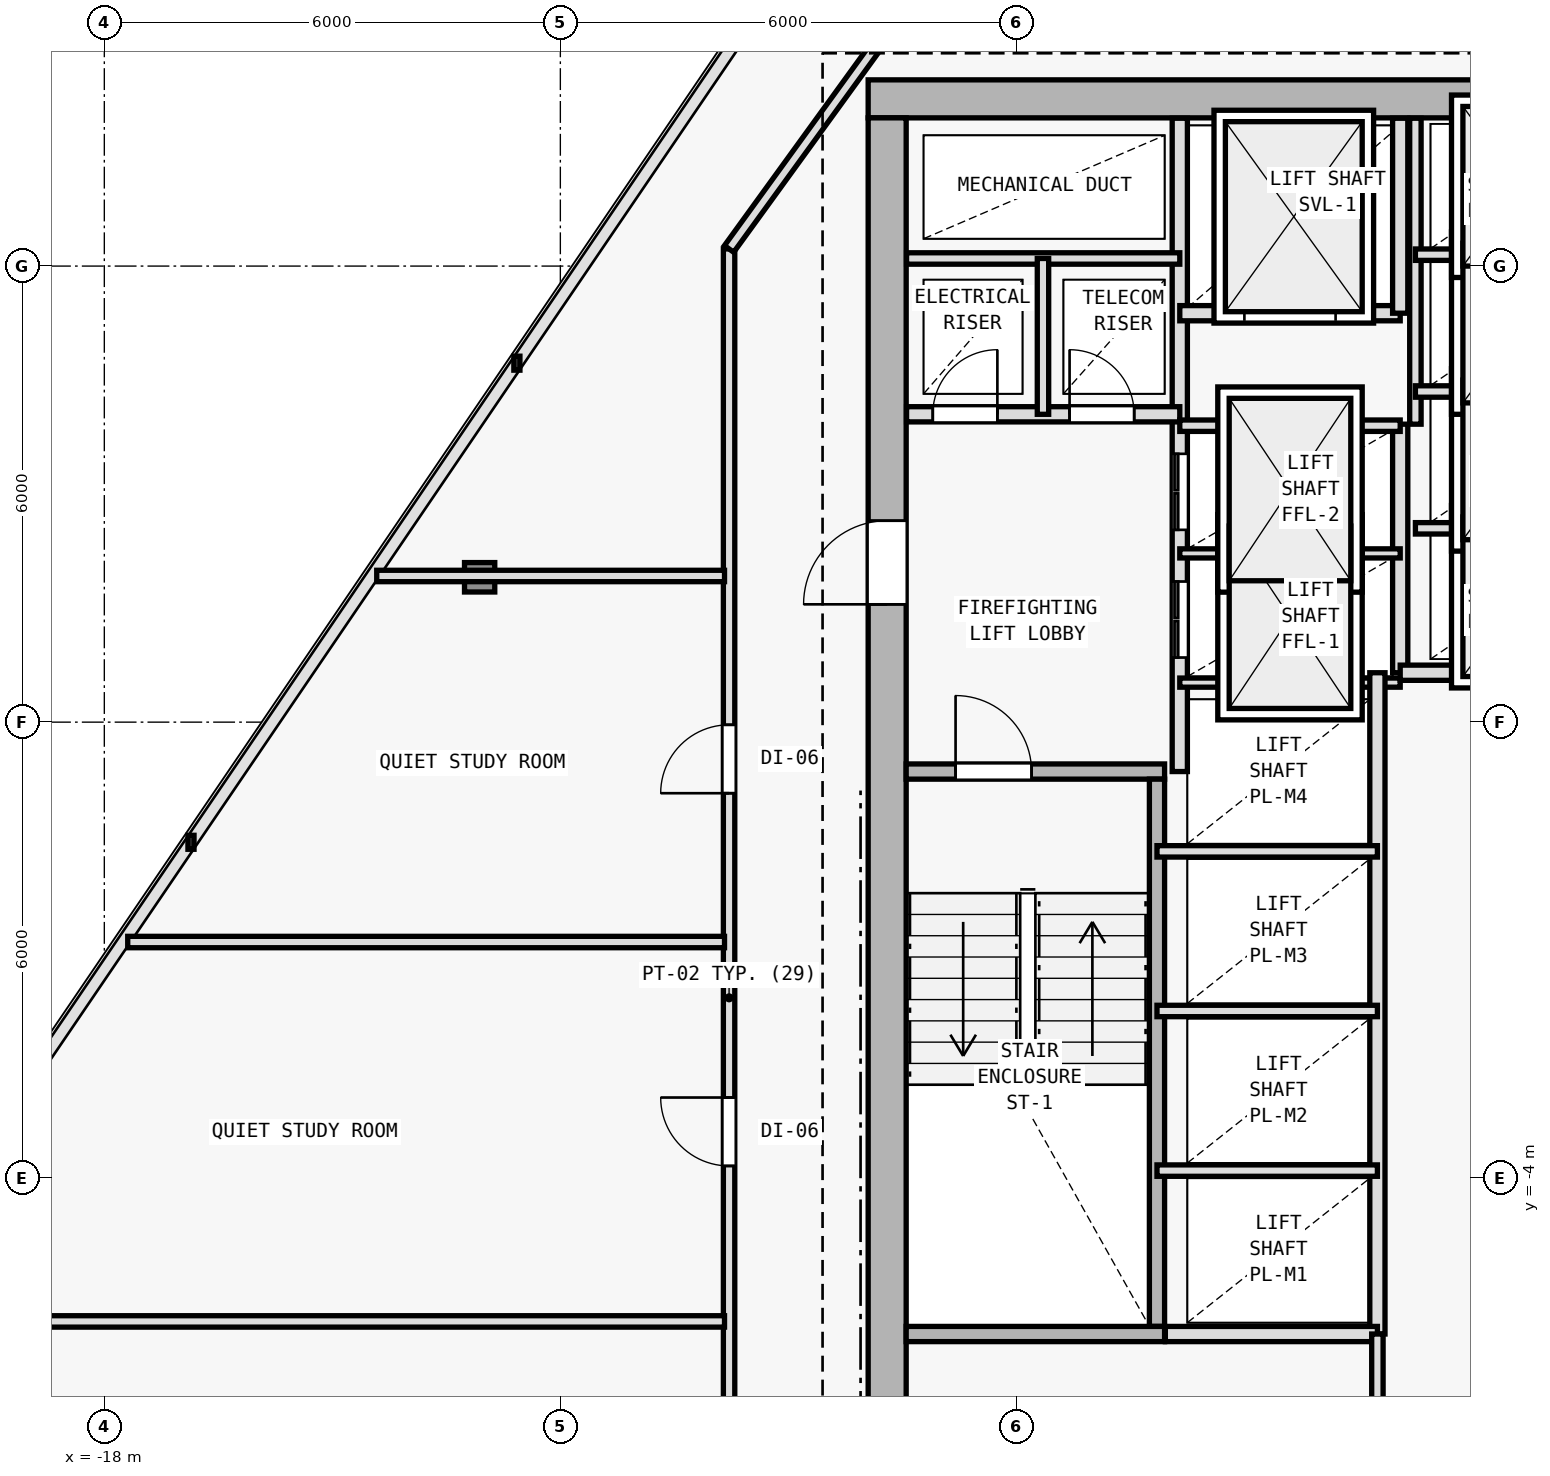
"""IFC4 building model, lengths in metres.
Left out: names, types, materials, properties, quantities, classifications, styles, units other than length and angle.
Written with IfcOpenShell. Run it as: python <this file> out.ifc"""

import sys

from ifc_helpers import new_model, si_unit, direction, frame, frame_2d, origin, origin_2d, place, context, subcontext, project, spatial, rectangle, i_section, extrude, element, fill, save


model = new_model("IFC4")
c1 = context("Model", 3, precision=1e-05, world=origin(), true_north=direction((0.0, 1.0)))
c2 = subcontext(c1, "Body", "Model", "MODEL_VIEW")
j1 = project(units=[si_unit("LENGTHUNIT", "METRE"), si_unit("PLANEANGLEUNIT", "RADIAN")], contexts=[c1])
p1 = place(None, origin())
s1 = spatial("IfcSite", under=j1, at=p1, CompositionType="ELEMENT")
p2 = place(p1, origin())
s2 = spatial("IfcBuilding", under=s1, at=p2, CompositionType="ELEMENT")
p3 = place(p2, frame((0.0, 0.0, 216.3)))
s3 = spatial("IfcBuildingStorey", under=s2, at=p3, CompositionType="ELEMENT", Elevation=216.3)
for number, where, z_axis, x_axis in (
    (1, (-7.7, 10.2, 0.0), (0.0, 0.0, 1.0), (1.0, 0.0, 0.0)),
    (2, (-7.7, 2.0, 0.0), (0.0, 0.0, 1.0), (1.0, 0.0, 0.0)),
):
    element("IfcColumn", number, at=place(p3, frame(where, z_axis=z_axis, x_axis=x_axis)), inside=s3, PredefinedType="COLUMN", context=c2, shape_type="SweptSolid", body=[
        extrude(i_section(OverallWidth=0.398, OverallDepth=0.387, WebThickness=0.013, FlangeThickness=0.022, FilletRadius=0.015, at=origin_2d()), origin(), (0.0, 0.0, 1.0), 3.6),
    ])
p4 = place(p3, frame((-13.062, 3.906, 0.005), z_axis=(0.017070406608, 0.009521342331, 0.99980895438), x_axis=(-0.487119351792, 0.873335409284, 0.0)))
e3 = element("IfcColumn", 3, at=p4, inside=s3, PredefinedType="COLUMN", context=c2, shape_type="SweptSolid", body=[
    extrude(i_section(OverallWidth=0.398, OverallDepth=0.387, WebThickness=0.013, FlangeThickness=0.022, FilletRadius=0.015, at=origin_2d()), origin(), (0.0, 0.0, 1.0), 3.59),
])
p5 = place(p3, frame((7.95, 10.2, 0.0), z_axis=(0.0, 0.0, 1.0), x_axis=(-1.0, 0.0, 0.0)))
e4 = element("IfcWall", 4, at=p5, inside=s3, PredefinedType="SHEAR", context=c2, shape_type="SweptSolid", body=[
    extrude(rectangle(XDim=15.9, YDim=0.5, at=frame_2d((7.95, 0.0))), origin(), (0.0, 0.0, 1.0), 3.35),
])
p6 = place(p5, frame((4.4, 0.0, 0.0)))
e5 = element("IfcOpeningElement", 5, at=p6, cuts=e4, PredefinedType="OPENING", context=c2, shape_type="SweptSolid", body=[
    extrude(rectangle(XDim=1.1, YDim=2.15, at=frame_2d((0.55, 1.075))), frame((0.0, 0.26, 0.0), z_axis=(0.0, -1.0, 0.0), x_axis=(1.0, 0.0, 0.0)), (0.0, 0.0, 1.0), 0.52),
])
p7 = place(p3, frame((-7.7, -9.15, 0.0), z_axis=(0.0, 0.0, 1.0), x_axis=(0.0, 1.0, 0.0)))
e6 = element("IfcWall", 6, at=p7, inside=s3, PredefinedType="SHEAR", context=c2, shape_type="SweptSolid", body=[
    extrude(rectangle(XDim=19.1, YDim=0.5, at=frame_2d((9.55, 0.0))), origin(), (0.0, 0.0, 1.0), 3.35),
])
p8 = place(p7, frame((12.7, 0.0, 0.0)))
e7 = element("IfcOpeningElement", 7, at=p8, cuts=e6, PredefinedType="OPENING", context=c2, shape_type="SweptSolid", body=[
    extrude(rectangle(XDim=1.1, YDim=2.15, at=frame_2d((0.55, 1.075))), frame((0.0, 0.26, 0.0), z_axis=(0.0, -1.0, 0.0), x_axis=(1.0, 0.0, 0.0)), (0.0, 0.0, 1.0), 0.52),
])
p9 = place(p3, frame((-7.45, 1.35, 0.0), z_axis=(0.0, 0.0, 1.0), x_axis=(1.0, 0.0, 0.0)))
e8 = element("IfcWall", 8, at=p9, inside=s3, PredefinedType="SOLIDWALL", context=c2, shape_type="SweptSolid", body=[
    extrude(rectangle(XDim=3.4, YDim=0.2, at=frame_2d((1.7, 0.0))), origin(), (0.0, 0.0, 1.0), 3.35),
])
p10 = place(p9, frame((0.65, 0.0, 0.0)))
e9 = element("IfcOpeningElement", 9, at=p10, cuts=e8, PredefinedType="OPENING", context=c2, shape_type="SweptSolid", body=[
    extrude(rectangle(XDim=1.0, YDim=2.15, at=frame_2d((0.5, 1.075))), frame((0.0, 0.11, 0.0), z_axis=(0.0, -1.0, 0.0), x_axis=(1.0, 0.0, 0.0)), (0.0, 0.0, 1.0), 0.22),
])
p11 = place(p3, frame((-4.15, -5.95, 0.0), z_axis=(0.0, 0.0, 1.0), x_axis=(0.0, 1.0, 0.0)))
e10 = element("IfcWall", 10, at=p11, inside=s3, PredefinedType="SOLIDWALL", context=c2, shape_type="SweptSolid", body=[
    extrude(rectangle(XDim=7.2, YDim=0.2, at=frame_2d((3.6, 0.0))), origin(), (0.0, 0.0, 1.0), 3.35),
])
p12 = place(p3, frame((-3.85, 1.35, 0.0), z_axis=(0.0, 0.0, 1.0), x_axis=(0.0, 1.0, 0.0)))
e11 = element("IfcWall", 11, at=p12, inside=s3, PredefinedType="SOLIDWALL", context=c2, shape_type="SweptSolid", body=[
    extrude(rectangle(XDim=8.595, YDim=0.2, at=frame_2d((4.297, 0.0))), origin(), (0.0, 0.0, 1.0), 3.35),
])
p13 = place(p12, frame((1.5, 0.0, 0.0)))
e12 = element("IfcOpeningElement", 12, at=p13, cuts=e11, PredefinedType="OPENING", context=c2, shape_type="SweptSolid", body=[
    extrude(rectangle(XDim=1.0, YDim=2.15, at=frame_2d((0.5, 1.075))), frame((0.0, 0.11, 0.0), z_axis=(0.0, -1.0, 0.0), x_axis=(1.0, 0.0, 0.0)), (0.0, 0.0, 1.0), 0.22),
])
p14 = place(p12, frame((3.18, 0.0, 0.0)))
e13 = element("IfcOpeningElement", 13, at=p14, cuts=e11, PredefinedType="OPENING", context=c2, shape_type="SweptSolid", body=[
    extrude(rectangle(XDim=1.0, YDim=2.15, at=frame_2d((0.5, 1.075))), frame((0.0, 0.11, 0.0), z_axis=(0.0, -1.0, 0.0), x_axis=(1.0, 0.0, 0.0)), (0.0, 0.0, 1.0), 0.22),
])
p15 = place(p3, frame((-7.445, 6.05, 0.0), z_axis=(0.0, 0.0, 1.0), x_axis=(1.0, 0.0, 0.0)))
e14 = element("IfcWall", 14, at=p15, inside=s3, PredefinedType="SOLIDWALL", context=c2, shape_type="SweptSolid", body=[
    extrude(rectangle(XDim=3.595, YDim=0.2, at=frame_2d((1.797, 0.0))), origin(), (0.0, 0.0, 1.0), 3.35),
])
p16 = place(p15, frame((0.345, 0.0, 0.0)))
e15 = element("IfcOpeningElement", 15, at=p16, cuts=e14, PredefinedType="OPENING", context=c2, shape_type="SweptSolid", body=[
    extrude(rectangle(XDim=0.85, YDim=2.1, at=frame_2d((0.425, 1.05))), frame((0.0, 0.11, 0.0), z_axis=(0.0, -1.0, 0.0), x_axis=(1.0, 0.0, 0.0)), (0.0, 0.0, 1.0), 0.22),
])
p17 = place(p15, frame((2.145, 0.0, 0.0)))
e16 = element("IfcOpeningElement", 16, at=p17, cuts=e14, PredefinedType="OPENING", context=c2, shape_type="SweptSolid", body=[
    extrude(rectangle(XDim=0.85, YDim=2.1, at=frame_2d((0.425, 1.05))), frame((0.0, 0.11, 0.0), z_axis=(0.0, -1.0, 0.0), x_axis=(1.0, 0.0, 0.0)), (0.0, 0.0, 1.0), 0.22),
])
p18 = place(p3, frame((-7.445, 8.1, 0.0), z_axis=(0.0, 0.0, 1.0), x_axis=(1.0, 0.0, 0.0)))
e17 = element("IfcWall", 17, at=p18, inside=s3, PredefinedType="PARTITIONING", context=c2, shape_type="SweptSolid", body=[
    extrude(rectangle(XDim=3.595, YDim=0.15, at=frame_2d((1.797, 0.0))), origin(), (0.0, 0.0, 1.0), 3.35),
])
p19 = place(p3, frame((-5.65, 6.05, 0.0), z_axis=(0.0, 0.0, 1.0), x_axis=(0.0, 1.0, 0.0)))
e18 = element("IfcWall", 18, at=p19, inside=s3, PredefinedType="PARTITIONING", context=c2, shape_type="SweptSolid", body=[
    extrude(rectangle(XDim=2.05, YDim=0.15, at=frame_2d((1.025, 0.0))), origin(), (0.0, 0.0, 1.0), 3.35),
])
p20 = place(p3, frame((-0.95, 2.65, 0.0), z_axis=(0.0, 0.0, 1.0), x_axis=(0.0, 1.0, 0.0)))
e19 = element("IfcWall", 19, at=p20, inside=s3, PredefinedType="SOLIDWALL", context=c2, shape_type="SweptSolid", body=[
    extrude(rectangle(XDim=3.27, YDim=0.2, at=frame_2d((1.635, 0.0))), origin(), (0.0, 0.0, 1.0), 3.35),
])
for number, where, z_axis, x_axis in (
    (20, (-3.85, 2.52, 0.0), (0.0, 0.0, 1.0), (1.0, 0.0, 0.0)),
    (21, (-3.85, 4.22, 0.0), (0.0, 0.0, 1.0), (1.0, 0.0, 0.0)),
):
    element("IfcWall", number, at=place(p3, frame(where, z_axis=z_axis, x_axis=x_axis)), inside=s3, PredefinedType="PARTITIONING", context=c2, shape_type="SweptSolid", body=[
        extrude(rectangle(XDim=2.9, YDim=0.12, at=frame_2d((1.45, 0.0))), origin(), (0.0, 0.0, 1.0), 3.35),
    ])
p21 = place(p3, frame((-3.85, 5.9, 0.0), z_axis=(0.0, 0.0, 1.0), x_axis=(1.0, 0.0, 0.0)))
e22 = element("IfcWall", 22, at=p21, inside=s3, PredefinedType="PARTITIONING", context=c2, shape_type="SweptSolid", body=[
    extrude(rectangle(XDim=2.9, YDim=0.15, at=frame_2d((1.45, 0.0))), origin(), (0.0, 0.0, 1.0), 3.35),
])
p22 = place(p3, frame((-3.85, 7.38, 0.0), z_axis=(0.0, 0.0, 1.0), x_axis=(1.0, 0.0, 0.0)))
e23 = element("IfcWall", 23, at=p22, inside=s3, PredefinedType="SOLIDWALL", context=c2, shape_type="SweptSolid", body=[
    extrude(rectangle(XDim=2.9, YDim=0.2, at=frame_2d((1.45, 0.0))), origin(), (0.0, 0.0, 1.0), 3.35),
])
p23 = place(p22, frame((0.85, 0.0, 0.0)))
e24 = element("IfcOpeningElement", 24, at=p23, cuts=e23, PredefinedType="OPENING", context=c2, shape_type="SweptSolid", body=[
    extrude(rectangle(XDim=1.2, YDim=2.2, at=frame_2d((0.6, 1.1))), frame((0.0, 0.11, 0.0), z_axis=(0.0, -1.0, 0.0), x_axis=(1.0, 0.0, 0.0)), (0.0, 0.0, 1.0), 0.22),
])
p24 = place(p3, frame((-0.95, 7.38, 0.0), z_axis=(0.0, 0.0, 1.0), x_axis=(0.0, 1.0, 0.0)))
e25 = element("IfcWall", 25, at=p24, inside=s3, PredefinedType="SOLIDWALL", context=c2, shape_type="SweptSolid", body=[
    extrude(rectangle(XDim=2.565, YDim=0.2, at=frame_2d((1.283, 0.0))), origin(), (0.0, 0.0, 1.0), 3.35),
])
p25 = place(p3, frame((-1.25, -6.05, 0.0), z_axis=(0.0, 0.0, 1.0), x_axis=(0.0, 1.0, 0.0)))
e26 = element("IfcWall", 26, at=p25, inside=s3, PredefinedType="SOLIDWALL", context=c2, shape_type="SweptSolid", body=[
    extrude(rectangle(XDim=8.7, YDim=0.2, at=frame_2d((4.35, 0.0))), origin(), (0.0, 0.0, 1.0), 3.35),
])
for number, where, z_axis, x_axis in (
    (27, (-4.15, -3.9, 0.0), (0.0, 0.0, 1.0), (1.0, 0.0, 0.0)),
    (28, (-4.15, -1.8, 0.0), (0.0, 0.0, 1.0), (1.0, 0.0, 0.0)),
    (29, (-4.15, 0.3, 0.0), (0.0, 0.0, 1.0), (1.0, 0.0, 0.0)),
):
    element("IfcWall", number, at=place(p3, frame(where, z_axis=z_axis, x_axis=x_axis)), inside=s3, PredefinedType="PARTITIONING", context=c2, shape_type="SweptSolid", body=[
        extrude(rectangle(XDim=2.9, YDim=0.15, at=frame_2d((1.45, 0.0))), origin(), (0.0, 0.0, 1.0), 3.35),
    ])
p26 = place(p3, frame((-0.95, 2.65, 0.0), z_axis=(0.0, 0.0, 1.0), x_axis=(1.0, 0.0, 0.0)))
e30 = element("IfcWall", 30, at=p26, inside=s3, PredefinedType="SOLIDWALL", context=c2, shape_type="SweptSolid", body=[
    extrude(rectangle(XDim=2.9, YDim=0.2, at=frame_2d((1.45, 0.0))), origin(), (0.0, 0.0, 1.0), 3.35),
])
p27 = place(p3, frame((-0.75, 5.92, 0.0), z_axis=(0.0, 0.0, 1.0), x_axis=(0.0, 1.0, 0.0)))
e31 = element("IfcWall", 31, at=p27, inside=s3, PredefinedType="PARTITIONING", context=c2, shape_type="SweptSolid", body=[
    extrude(rectangle(XDim=4.025, YDim=0.15, at=frame_2d((2.013, 0.0))), origin(), (0.0, 0.0, 1.0), 3.35),
])
for number, where, z_axis, x_axis in (
    (32, (-0.75, 4.55, 0.0), (0.0, 0.0, 1.0), (1.0, 0.0, 0.0)),
    (33, (-0.75, 6.35, 0.0), (0.0, 0.0, 1.0), (1.0, 0.0, 0.0)),
    (34, (-0.75, 8.15, 0.0), (0.0, 0.0, 1.0), (1.0, 0.0, 0.0)),
):
    element("IfcWall", number, at=place(p3, frame(where, z_axis=z_axis, x_axis=x_axis)), inside=s3, PredefinedType="PARTITIONING", context=c2, shape_type="SweptSolid", body=[
        extrude(rectangle(XDim=2.7, YDim=0.15, at=frame_2d((1.35, 0.0))), origin(), (0.0, 0.0, 1.0), 3.35),
    ])
p28 = place(p3, frame((-7.45, -6.05, 0.0), z_axis=(0.0, 0.0, 1.0), x_axis=(1.0, 0.0, 0.0)))
e35 = element("IfcWall", 35, at=p28, inside=s3, PredefinedType="SOLIDWALL", context=c2, shape_type="SweptSolid", body=[
    extrude(rectangle(XDim=3.4, YDim=0.2, at=frame_2d((1.7, 0.0))), origin(), (0.0, 0.0, 1.0), 3.35),
])
p29 = place(p3, frame((-4.04, -6.05, 0.0), z_axis=(0.0, 0.0, 1.0), x_axis=(1.0, 0.0, 0.0)))
e36 = element("IfcWall", 36, at=p29, inside=s3, PredefinedType="SOLIDWALL", context=c2, shape_type="SweptSolid", body=[
    extrude(rectangle(XDim=2.79, YDim=0.2, at=frame_2d((1.395, 0.0))), origin(), (0.0, 0.0, 1.0), 3.35),
])
p30 = place(p3, frame((-1.25, -9.145, 0.0), z_axis=(0.0, 0.0, 1.0), x_axis=(0.0, 1.0, 0.0)))
e37 = element("IfcWall", 37, at=p30, inside=s3, PredefinedType="PARTITIONING", context=c2, shape_type="SweptSolid", body=[
    extrude(rectangle(XDim=3.095, YDim=0.15, at=frame_2d((1.547, 0.0))), origin(), (0.0, 0.0, 1.0), 3.35),
])
p31 = place(p30, frame((0.845, 0.0, 0.0)))
e38 = element("IfcOpeningElement", 38, at=p31, cuts=e37, PredefinedType="OPENING", context=c2, shape_type="SweptSolid", body=[
    extrude(rectangle(XDim=0.95, YDim=2.1, at=frame_2d((0.475, 1.05))), frame((0.0, 0.085, 0.0), z_axis=(0.0, -1.0, 0.0), x_axis=(1.0, 0.0, 0.0)), (0.0, 0.0, 1.0), 0.17),
])
p32 = place(p3, frame((-9.78, -11.48, 0.0), z_axis=(0.0, 0.0, 1.0), x_axis=(0.0, 1.0, 0.0)))
e39 = element("IfcWall", 39, at=p32, inside=s3, PredefinedType="PARTITIONING", context=c2, shape_type="SweptSolid", body=[
    extrude(rectangle(XDim=19.706, YDim=0.15, at=frame_2d((9.853, 0.0))), origin(), (0.0, 0.0, 1.0), 2.825),
])
p33 = place(p32, frame((7.641, 0.0, 0.0)))
e40 = element("IfcOpeningElement", 40, at=p33, cuts=e39, PredefinedType="OPENING", context=c2, shape_type="SweptSolid", body=[
    extrude(rectangle(XDim=0.9, YDim=2.1, at=frame_2d((0.45, 1.05))), frame((0.0, 0.085, 0.0), z_axis=(0.0, -1.0, 0.0), x_axis=(1.0, 0.0, 0.0)), (0.0, 0.0, 1.0), 0.17),
])
p34 = place(p32, frame((2.437, 0.0, 0.0)))
e41 = element("IfcOpeningElement", 41, at=p34, cuts=e39, PredefinedType="OPENING", context=c2, shape_type="SweptSolid", body=[
    extrude(rectangle(XDim=0.9, YDim=2.1, at=frame_2d((0.45, 1.05))), frame((0.0, 0.085, 0.0), z_axis=(0.0, -1.0, 0.0), x_axis=(1.0, 0.0, 0.0)), (0.0, 0.0, 1.0), 0.17),
])
p35 = place(p32, frame((12.545, 0.0, 0.0)))
e42 = element("IfcOpeningElement", 42, at=p35, cuts=e39, PredefinedType="OPENING", context=c2, shape_type="SweptSolid", body=[
    extrude(rectangle(XDim=0.9, YDim=2.1, at=frame_2d((0.45, 1.05))), frame((0.0, 0.085, 0.0), z_axis=(0.0, -1.0, 0.0), x_axis=(1.0, 0.0, 0.0)), (0.0, 0.0, 1.0), 0.17),
])
p36 = place(p3, frame((-9.78, 8.226, 0.0), z_axis=(0.0, 0.0, 1.0), x_axis=(0.586956386413, 0.809618552436, 0.0)))
e43 = element("IfcWall", 43, at=p36, inside=s3, PredefinedType="PARTITIONING", context=c2, shape_type="SweptSolid", body=[
    extrude(rectangle(XDim=5.008, YDim=0.15, at=frame_2d((2.504, 0.0))), origin(), (0.0, 0.0, 1.0), 2.975),
])
p37 = place(p3, frame((-9.84, 3.923, 0.0), z_axis=(0.0, 0.0, 1.0), x_axis=(-1.0, 0.0, 0.0)))
e44 = element("IfcWall", 44, at=p37, inside=s3, PredefinedType="PARTITIONING", context=c2, shape_type="SweptSolid", body=[
    extrude(rectangle(XDim=4.576, YDim=0.15, at=frame_2d((2.288, 0.0))), origin(), (0.0, 0.0, 1.0), 2.975),
])
p38 = place(p3, frame((-9.84, -5.884, 0.0), z_axis=(0.0, 0.0, 1.0), x_axis=(-1.0, 0.0, 0.0)))
e45 = element("IfcWall", 45, at=p38, inside=s3, PredefinedType="PARTITIONING", context=c2, shape_type="SweptSolid", body=[
    extrude(rectangle(XDim=11.247, YDim=0.15, at=frame_2d((5.624, 0.0))), origin(), (0.0, 0.0, 1.0), 2.825),
])
p39 = place(p3, frame((-9.84, -0.893, 0.0), z_axis=(0.0, 0.0, 1.0), x_axis=(-1.0, 0.0, 0.0)))
e46 = element("IfcWall", 46, at=p39, inside=s3, PredefinedType="PARTITIONING", context=c2, shape_type="SweptSolid", body=[
    extrude(rectangle(XDim=7.852, YDim=0.15, at=frame_2d((3.926, 0.0))), origin(), (0.0, 0.0, 1.0), 2.925),
])
p40 = place(p8, origin())
e47 = element("IfcDoor", 47, at=p40, inside=s3, OperationType="SINGLE_SWING_LEFT", PredefinedType="DOOR", context=c2, shape_type="SweptSolid", body=[
    extrude(rectangle(XDim=1.1, YDim=2.15, at=frame_2d((0.55, 1.075))), frame((0.0, 0.025, 0.0), z_axis=(0.0, -1.0, 0.0), x_axis=(1.0, 0.0, 0.0)), (0.0, 0.0, 1.0), 0.05),
])
fill(e7, e47)
p41 = place(p10, origin())
e48 = element("IfcDoor", 48, at=p41, inside=s3, OperationType="SINGLE_SWING_LEFT", PredefinedType="DOOR", context=c2, shape_type="SweptSolid", body=[
    extrude(rectangle(XDim=1.0, YDim=2.15, at=frame_2d((0.5, 1.075))), frame((0.0, 0.025, 0.0), z_axis=(0.0, -1.0, 0.0), x_axis=(1.0, 0.0, 0.0)), (0.0, 0.0, 1.0), 0.05),
])
fill(e9, e48)
p42 = place(p16, origin())
e49 = element("IfcDoor", 49, at=p42, inside=s3, OperationType="SINGLE_SWING_RIGHT", PredefinedType="DOOR", context=c2, shape_type="SweptSolid", body=[
    extrude(rectangle(XDim=0.85, YDim=2.1, at=frame_2d((0.425, 1.05))), frame((0.0, 0.025, 0.0), z_axis=(0.0, -1.0, 0.0), x_axis=(1.0, 0.0, 0.0)), (0.0, 0.0, 1.0), 0.05),
])
fill(e15, e49)
p43 = place(p17, origin())
e50 = element("IfcDoor", 50, at=p43, inside=s3, OperationType="SINGLE_SWING_LEFT", PredefinedType="DOOR", context=c2, shape_type="SweptSolid", body=[
    extrude(rectangle(XDim=0.85, YDim=2.1, at=frame_2d((0.425, 1.05))), frame((0.0, 0.025, 0.0), z_axis=(0.0, -1.0, 0.0), x_axis=(1.0, 0.0, 0.0)), (0.0, 0.0, 1.0), 0.05),
])
fill(e16, e50)
p44 = place(p23, origin())
e51 = element("IfcDoor", 51, at=p44, inside=s3, OperationType="DOUBLE_DOOR_SLIDING", PredefinedType="DOOR", context=c2, shape_type="SweptSolid", body=[
    extrude(rectangle(XDim=1.2, YDim=2.2, at=frame_2d((0.6, 1.1))), frame((0.0, 0.025, 0.0), z_axis=(0.0, -1.0, 0.0), x_axis=(1.0, 0.0, 0.0)), (0.0, 0.0, 1.0), 0.05),
])
fill(e24, e51)
p45 = place(p13, origin())
e52 = element("IfcDoor", 52, at=p45, inside=s3, OperationType="DOUBLE_DOOR_SLIDING", PredefinedType="DOOR", context=c2, shape_type="SweptSolid", body=[
    extrude(rectangle(XDim=1.0, YDim=2.15, at=frame_2d((0.5, 1.075))), frame((0.0, 0.025, 0.0), z_axis=(0.0, -1.0, 0.0), x_axis=(1.0, 0.0, 0.0)), (0.0, 0.0, 1.0), 0.05),
])
fill(e12, e52)
p46 = place(p14, origin())
e53 = element("IfcDoor", 53, at=p46, inside=s3, OperationType="DOUBLE_DOOR_SLIDING", PredefinedType="DOOR", context=c2, shape_type="SweptSolid", body=[
    extrude(rectangle(XDim=1.0, YDim=2.15, at=frame_2d((0.5, 1.075))), frame((0.0, 0.025, 0.0), z_axis=(0.0, -1.0, 0.0), x_axis=(1.0, 0.0, 0.0)), (0.0, 0.0, 1.0), 0.05),
])
fill(e13, e53)
p47 = place(p33, origin())
e54 = element("IfcDoor", 54, at=p47, inside=s3, OperationType="SINGLE_SWING_RIGHT", PredefinedType="DOOR", context=c2, shape_type="SweptSolid", body=[
    extrude(rectangle(XDim=0.9, YDim=2.1, at=frame_2d((0.45, 1.05))), frame((0.0, 0.025, 0.0), z_axis=(0.0, -1.0, 0.0), x_axis=(1.0, 0.0, 0.0)), (0.0, 0.0, 1.0), 0.05),
])
fill(e40, e54)
p48 = place(p35, origin())
e55 = element("IfcDoor", 55, at=p48, inside=s3, OperationType="SINGLE_SWING_LEFT", PredefinedType="DOOR", context=c2, shape_type="SweptSolid", body=[
    extrude(rectangle(XDim=0.9, YDim=2.1, at=frame_2d((0.45, 1.05))), frame((0.0, 0.025, 0.0), z_axis=(0.0, -1.0, 0.0), x_axis=(1.0, 0.0, 0.0)), (0.0, 0.0, 1.0), 0.05),
])
fill(e42, e55)
save(model, sys.argv[1])
